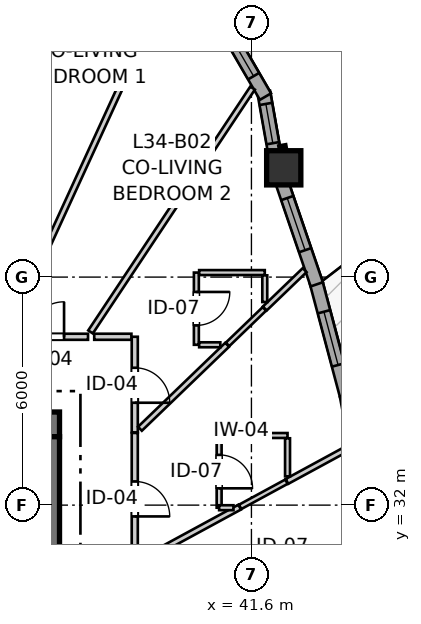
"""IFC4 building model, lengths in metres.
Left out: names, types, materials, properties, quantities, classifications, styles, units other than length and angle.
Written with IfcOpenShell. Run it as: python <this file> out.ifc"""

import sys

from ifc_helpers import new_model, si_unit, direction, frame, frame_2d, origin, origin_2d, place, context, subcontext, project, spatial, rectangle, extrude, source, transform, mapped, element, fill, save


model = new_model("IFC4")
c1 = context("Model", 3, precision=1e-05, world=origin(), true_north=direction((0.0, 1.0)))
c2 = subcontext(c1, "Body", "Model", "MODEL_VIEW")
j1 = project(units=[si_unit("LENGTHUNIT", "METRE"), si_unit("PLANEANGLEUNIT", "RADIAN")], contexts=[c1])
p1 = place(None, origin())
s1 = spatial("IfcSite", under=j1, at=p1, CompositionType="ELEMENT")
p2 = place(p1, origin())
s2 = spatial("IfcBuilding", under=s1, at=p2, CompositionType="ELEMENT")
p3 = place(p2, frame((0.0, 0.0, 115.2)))
s3 = spatial("IfcBuildingStorey", under=s2, at=p3, CompositionType="ELEMENT", Elevation=115.2)
p4 = place(p3, frame((36.55, 34.125, 0.0), z_axis=(0.0, 0.0, 1.0), x_axis=(-1.0, 0.0, 0.0)))
e1 = element("IfcWall", 1, at=p4, inside=s3, PredefinedType="SHEAR", context=c2, shape_type="SweptSolid", body=[
    extrude(rectangle(XDim=12.4, YDim=0.65, at=frame_2d((6.2, 0.0))), origin(), (0.0, 0.0, 1.0), 2.95),
])
p5 = place(p3, frame((36.225, 18.2, 0.0), z_axis=(0.0, 0.0, 1.0), x_axis=(0.0, 1.0, 0.0)))
e2 = element("IfcWall", 2, at=p5, inside=s3, PredefinedType="SHEAR", context=c2, shape_type="SweptSolid", body=[
    extrude(rectangle(XDim=15.6, YDim=0.65, at=frame_2d((7.8, 0.0))), origin(), (0.0, 0.0, 1.0), 2.95),
])
p6 = place(p5, frame((4.25, 0.0, 0.0)))
e3 = element("IfcOpeningElement", 3, at=p6, cuts=e2, PredefinedType="OPENING", context=c2, shape_type="SweptSolid", body=[
    extrude(rectangle(XDim=1.1, YDim=2.15, at=frame_2d((0.55, 1.075))), frame((0.0, 0.335, 0.0), z_axis=(0.0, -1.0, 0.0), x_axis=(1.0, 0.0, 0.0)), (0.0, 0.0, 1.0), 0.67),
])
p7 = place(p5, frame((10.25, 0.0, 0.0)))
e4 = element("IfcOpeningElement", 4, at=p7, cuts=e2, PredefinedType="OPENING", context=c2, shape_type="SweptSolid", body=[
    extrude(rectangle(XDim=1.1, YDim=2.15, at=frame_2d((0.55, 1.075))), frame((0.0, 0.335, 0.0), z_axis=(0.0, -1.0, 0.0), x_axis=(1.0, 0.0, 0.0)), (0.0, 0.0, 1.0), 0.67),
])
m1 = source(origin(), c2, "Body", "SweptSolid", [
    extrude(rectangle(XDim=0.9, YDim=0.9, at=origin_2d()), origin(), (0.0, 0.0, 1.0), 2.95),
])
p8 = place(p3, frame((42.45, 40.875, 0.0), z_axis=(0.0, 0.0, 1.0), x_axis=(1.0, 0.0, 0.0)))
e5 = element("IfcColumn", 5, at=p8, inside=s3, PredefinedType="COLUMN", context=c2, shape_type="MappedRepresentation", body=[
    mapped(m1, transform((0.0, 0.0, 0.0), x_axis=(1.0, 0.0, 0.0), y_axis=(0.0, 1.0, 0.0), z_axis=(0.0, 0.0, 1.0), scale=1.0)),
])
p9 = place(p3, frame((44.664, 31.881, 0.0), z_axis=(0.0, 0.0, 1.0), x_axis=(-0.18665909876, 0.982424745642, 0.0)))
e6 = element("IfcWall", 6, at=p9, inside=s3, PredefinedType="SOLIDWALL", context=c2, shape_type="SweptSolid", body=[
    extrude(rectangle(XDim=3.046, YDim=0.34, at=frame_2d((1.523, 0.0))), origin(), (0.0, 0.0, 1.0), 2.48),
])
p10 = place(p9, frame((0.416, 0.0, 0.82)))
e7 = element("IfcOpeningElement", 7, at=p10, cuts=e6, PredefinedType="OPENING", context=c2, shape_type="SweptSolid", body=[
    extrude(rectangle(XDim=0.95, YDim=1.35, at=frame_2d((0.475, 0.675))), frame((0.0, 0.18, 0.0), z_axis=(0.0, -1.0, 0.0), x_axis=(1.0, 0.0, 0.0)), (0.0, 0.0, 1.0), 0.36),
])
p11 = place(p9, frame((2.054, 0.0, 0.82)))
e8 = element("IfcOpeningElement", 8, at=p11, cuts=e6, PredefinedType="OPENING", context=c2, shape_type="SweptSolid", body=[
    extrude(rectangle(XDim=0.58, YDim=1.35, at=frame_2d((0.29, 0.675))), frame((0.0, 0.18, 0.0), z_axis=(0.0, -1.0, 0.0), x_axis=(1.0, 0.0, 0.0)), (0.0, 0.0, 1.0), 0.36),
])
p12 = place(p3, frame((44.09, 34.901, 0.0), z_axis=(0.0, 0.0, 1.0), x_axis=(-0.257108087637, 0.966382652613, 0.0)))
e9 = element("IfcWall", 9, at=p12, inside=s3, PredefinedType="SOLIDWALL", context=c2, shape_type="SweptSolid", body=[
    extrude(rectangle(XDim=3.096, YDim=0.34, at=frame_2d((1.548, 0.0))), origin(), (0.0, 0.0, 1.0), 2.48),
])
p13 = place(p12, frame((0.813, 0.0, 0.82)))
e10 = element("IfcOpeningElement", 10, at=p13, cuts=e9, PredefinedType="OPENING", context=c2, shape_type="SweptSolid", body=[
    extrude(rectangle(XDim=1.45, YDim=1.25, at=frame_2d((0.725, 0.625))), frame((0.0, 0.18, 0.0), z_axis=(0.0, -1.0, 0.0), x_axis=(1.0, 0.0, 0.0)), (0.0, 0.0, 1.0), 0.36),
])
p14 = place(p3, frame((43.319, 37.809, 0.0), z_axis=(0.0, 0.0, 1.0), x_axis=(-0.323586371726, 0.946198636669, 0.0)))
e11 = element("IfcWall", 11, at=p14, inside=s3, PredefinedType="SOLIDWALL", context=c2, shape_type="SweptSolid", body=[
    extrude(rectangle(XDim=2.952, YDim=0.34, at=frame_2d((1.476, 0.0))), origin(), (0.0, 0.0, 1.0), 2.48),
])
p15 = place(p14, frame((0.949, 0.0, 0.82)))
e12 = element("IfcOpeningElement", 12, at=p15, cuts=e11, PredefinedType="OPENING", context=c2, shape_type="SweptSolid", body=[
    extrude(rectangle(XDim=1.45, YDim=1.25, at=frame_2d((0.725, 0.625))), frame((0.0, 0.18, 0.0), z_axis=(0.0, -1.0, 0.0), x_axis=(1.0, 0.0, 0.0)), (0.0, 0.0, 1.0), 0.36),
])
p16 = place(p3, frame((42.242, 41.072, 0.0), z_axis=(0.0, 0.0, 1.0), x_axis=(-0.17440141227, 0.984674640375, 0.0)))
e13 = element("IfcWall", 13, at=p16, inside=s3, PredefinedType="SOLIDWALL", context=c2, shape_type="SweptSolid", body=[
    extrude(rectangle(XDim=1.831, YDim=0.34, at=frame_2d((0.916, 0.0))), origin(), (0.0, 0.0, 1.0), 2.48),
])
p17 = place(p16, frame((0.457, 0.0, 0.82)))
e14 = element("IfcOpeningElement", 14, at=p17, cuts=e13, PredefinedType="OPENING", context=c2, shape_type="SweptSolid", body=[
    extrude(rectangle(XDim=1.05, YDim=1.45, at=frame_2d((0.525, 0.725))), frame((0.0, 0.18, 0.0), z_axis=(0.0, -1.0, 0.0), x_axis=(1.0, 0.0, 0.0)), (0.0, 0.0, 1.0), 0.36),
])
p18 = place(p3, frame((41.969, 42.749, 0.0), z_axis=(0.0, 0.0, 1.0), x_axis=(-0.501989603552, 0.864873654313, 0.0)))
e15 = element("IfcWall", 15, at=p18, inside=s3, PredefinedType="SOLIDWALL", context=c2, shape_type="SweptSolid", body=[
    extrude(rectangle(XDim=2.099, YDim=0.34, at=frame_2d((1.05, 0.0))), origin(), (0.0, 0.0, 1.0), 2.48),
])
p19 = place(p18, frame((0.622, 0.0, 0.82)))
e16 = element("IfcOpeningElement", 16, at=p19, cuts=e15, PredefinedType="OPENING", context=c2, shape_type="SweptSolid", body=[
    extrude(rectangle(XDim=1.15, YDim=1.2, at=frame_2d((0.575, 0.6))), frame((0.0, 0.18, 0.0), z_axis=(0.0, -1.0, 0.0), x_axis=(1.0, 0.0, 0.0)), (0.0, 0.0, 1.0), 0.36),
])
p20 = place(p3, frame((38.53, 33.899, 0.0), z_axis=(0.0, 0.0, 1.0), x_axis=(0.0, -1.0, 0.0)))
e17 = element("IfcWall", 17, at=p20, inside=s3, PredefinedType="PARTITIONING", context=c2, shape_type="SweptSolid", body=[
    extrude(rectangle(XDim=3.469, YDim=0.16, at=frame_2d((1.734, 0.0))), origin(), (0.0, 0.0, 1.0), 2.95),
])
p21 = place(p20, frame((1.277, 0.0, 0.0)))
e18 = element("IfcOpeningElement", 18, at=p21, cuts=e17, PredefinedType="OPENING", context=c2, shape_type="SweptSolid", body=[
    extrude(rectangle(XDim=0.92, YDim=2.1, at=frame_2d((0.46, 1.05))), frame((0.0, 0.09, 0.0), z_axis=(0.0, -1.0, 0.0), x_axis=(1.0, 0.0, 0.0)), (0.0, 0.0, 1.0), 0.18),
])
p22 = place(p3, frame((38.53, 36.43, 0.0), z_axis=(0.0, 0.0, 1.0), x_axis=(0.0, -1.0, 0.0)))
e19 = element("IfcWall", 19, at=p22, inside=s3, PredefinedType="PARTITIONING", context=c2, shape_type="SweptSolid", body=[
    extrude(rectangle(XDim=2.516, YDim=0.16, at=frame_2d((1.258, 0.0))), origin(), (0.0, 0.0, 1.0), 2.588),
])
p23 = place(p22, frame((0.816, 0.0, 0.0)))
e20 = element("IfcOpeningElement", 20, at=p23, cuts=e19, PredefinedType="OPENING", context=c2, shape_type="SweptSolid", body=[
    extrude(rectangle(XDim=0.92, YDim=2.1, at=frame_2d((0.46, 1.05))), frame((0.0, 0.09, 0.0), z_axis=(0.0, -1.0, 0.0), x_axis=(1.0, 0.0, 0.0)), (0.0, 0.0, 1.0), 0.18),
])
p24 = place(p3, frame((35.121, 36.43, 0.0), z_axis=(0.0, 0.0, 1.0), x_axis=(1.0, 0.0, 0.0)))
e21 = element("IfcWall", 21, at=p24, inside=s3, PredefinedType="PARTITIONING", context=c2, shape_type="SweptSolid", body=[
    extrude(rectangle(XDim=2.179, YDim=0.16, at=frame_2d((1.089, 0.0))), origin(), (0.0, 0.0, 1.0), 2.588),
])
p25 = place(p24, frame((0.628, 0.0, 0.0)))
e22 = element("IfcOpeningElement", 22, at=p25, cuts=e21, PredefinedType="OPENING", context=c2, shape_type="SweptSolid", body=[
    extrude(rectangle(XDim=0.92, YDim=2.1, at=frame_2d((0.46, 1.05))), frame((0.0, 0.09, 0.0), z_axis=(0.0, -1.0, 0.0), x_axis=(1.0, 0.0, 0.0)), (0.0, 0.0, 1.0), 0.18),
])
p26 = place(p3, frame((40.75, 33.832, 0.0), z_axis=(0.0, 0.0, 1.0), x_axis=(0.0, -1.0, 0.0)))
e23 = element("IfcWall", 23, at=p26, inside=s3, PredefinedType="PARTITIONING", context=c2, shape_type="SweptSolid", body=[
    extrude(rectangle(XDim=1.9, YDim=0.13, at=frame_2d((0.95, 0.0))), origin(), (0.0, 0.0, 1.0), 2.95),
])
p27 = place(p26, frame((0.51, 0.0, 0.0)))
e24 = element("IfcOpeningElement", 24, at=p27, cuts=e23, PredefinedType="OPENING", context=c2, shape_type="SweptSolid", body=[
    extrude(rectangle(XDim=0.88, YDim=2.05, at=frame_2d((0.44, 1.025))), frame((0.0, 0.075, 0.0), z_axis=(0.0, -1.0, 0.0), x_axis=(1.0, 0.0, 0.0)), (0.0, 0.0, 1.0), 0.15),
])
p28 = place(p3, frame((40.151, 38.119, 0.0), z_axis=(0.0, 0.0, 1.0), x_axis=(0.0, -1.0, 0.0)))
e25 = element("IfcWall", 25, at=p28, inside=s3, PredefinedType="PARTITIONING", context=c2, shape_type="SweptSolid", body=[
    extrude(rectangle(XDim=1.9, YDim=0.13, at=frame_2d((0.95, 0.0))), origin(), (0.0, 0.0, 1.0), 2.95),
])
p29 = place(p28, frame((0.51, 0.0, 0.0)))
e26 = element("IfcOpeningElement", 26, at=p29, cuts=e25, PredefinedType="OPENING", context=c2, shape_type="SweptSolid", body=[
    extrude(rectangle(XDim=0.88, YDim=2.05, at=frame_2d((0.44, 1.025))), frame((0.0, 0.075, 0.0), z_axis=(0.0, -1.0, 0.0), x_axis=(1.0, 0.0, 0.0)), (0.0, 0.0, 1.0), 0.15),
])
p30 = place(p3, frame((35.191, 36.548, 0.0), z_axis=(0.0, 0.0, 1.0), x_axis=(0.417154036681, 0.908835799075, 0.0)))
e27 = element("IfcWall", 27, at=p30, inside=s3, PredefinedType="PARTITIONING", context=c2, shape_type="SweptSolid", body=[
    extrude(rectangle(XDim=9.949, YDim=0.145, at=frame_2d((4.974, 0.0))), origin(), (0.0, 0.0, 1.0), 2.95),
])
p31 = place(p3, frame((37.366, 36.557, 0.0), z_axis=(0.0, 0.0, 1.0), x_axis=(0.553463679146, 0.832873313215, 0.0)))
e28 = element("IfcWall", 28, at=p31, inside=s3, PredefinedType="PARTITIONING", context=c2, shape_type="SweptSolid", body=[
    extrude(rectangle(XDim=7.704, YDim=0.145, at=frame_2d((3.852, 0.0))), origin(), (0.0, 0.0, 1.0), 2.95),
])
p32 = place(p3, frame((38.666, 34.009, 0.0), z_axis=(0.0, 0.0, 1.0), x_axis=(0.72031454127, 0.693647577402, 0.0)))
e29 = element("IfcWall", 29, at=p32, inside=s3, PredefinedType="PARTITIONING", context=c2, shape_type="SweptSolid", body=[
    extrude(rectangle(XDim=3.186, YDim=0.145, at=frame_2d((1.593, 0.0))), origin(), (0.0, 0.0, 1.0), 2.95),
])
p33 = place(p3, frame((38.652, 30.513, 0.0), z_axis=(0.0, 0.0, 1.0), x_axis=(0.878637115469, 0.47749012484, 0.0)))
e30 = element("IfcWall", 30, at=p33, inside=s3, PredefinedType="PARTITIONING", context=c2, shape_type="SweptSolid", body=[
    extrude(rectangle(XDim=3.003, YDim=0.145, at=frame_2d((1.501, 0.0))), origin(), (0.0, 0.0, 1.0), 2.95),
])
p34 = place(p3, frame((42.535, 32.624, 0.0), z_axis=(0.0, 0.0, 1.0), x_axis=(0.878631690287, 0.477500107669, 0.0)))
e31 = element("IfcWall", 31, at=p34, inside=s3, PredefinedType="PARTITIONING", context=c2, shape_type="SweptSolid", body=[
    extrude(rectangle(XDim=1.861, YDim=0.145, at=frame_2d((0.93, 0.0))), origin(), (0.0, 0.0, 1.0), 2.95),
])
p35 = place(p3, frame((40.224, 38.119, 0.0), z_axis=(0.0, 0.0, 1.0), x_axis=(1.0, 0.0, 0.0)))
e32 = element("IfcWall", 32, at=p35, inside=s3, PredefinedType="PARTITIONING", context=c2, shape_type="SweptSolid", body=[
    extrude(rectangle(XDim=1.727, YDim=0.13, at=frame_2d((0.863, 0.0))), origin(), (0.0, 0.0, 1.0), 2.95),
])
p36 = place(p3, frame((40.823, 33.832, 0.0), z_axis=(0.0, 0.0, 1.0), x_axis=(1.0, 0.0, 0.0)))
e33 = element("IfcWall", 33, at=p36, inside=s3, PredefinedType="PARTITIONING", context=c2, shape_type="SweptSolid", body=[
    extrude(rectangle(XDim=1.727, YDim=0.13, at=frame_2d((0.864, 0.0))), origin(), (0.0, 0.0, 1.0), 2.95),
])
p37 = place(p3, frame((41.951, 37.173, 0.0), z_axis=(0.0, 0.0, 1.0), x_axis=(0.720559112487, 0.693393514111, 0.0)))
e34 = element("IfcWall", 34, at=p37, inside=s3, PredefinedType="PARTITIONING", context=c2, shape_type="SweptSolid", body=[
    extrude(rectangle(XDim=1.456, YDim=0.145, at=frame_2d((0.728, 0.0))), origin(), (0.0, 0.0, 1.0), 2.95),
])
p38 = place(p3, frame((41.303, 31.954, 0.0), z_axis=(0.0, 0.0, 1.0), x_axis=(0.87855387187, 0.477643270885, 0.0)))
e35 = element("IfcWall", 35, at=p38, inside=s3, PredefinedType="PARTITIONING", context=c2, shape_type="SweptSolid", body=[
    extrude(rectangle(XDim=1.387, YDim=0.13, at=frame_2d((0.694, 0.0))), origin(), (0.0, 0.0, 1.0), 2.95),
])
p39 = place(p3, frame((40.972, 36.229, 0.0), z_axis=(0.0, 0.0, 1.0), x_axis=(0.72014550452, 0.693823069896, 0.0)))
e36 = element("IfcWall", 36, at=p39, inside=s3, PredefinedType="PARTITIONING", context=c2, shape_type="SweptSolid", body=[
    extrude(rectangle(XDim=1.345, YDim=0.13, at=frame_2d((0.672, 0.0))), origin(), (0.0, 0.0, 1.0), 2.95),
])
p40 = place(p3, frame((37.463, 36.43, 0.0), z_axis=(0.0, 0.0, 1.0), x_axis=(1.0, 0.0, 0.0)))
e37 = element("IfcWall", 37, at=p40, inside=s3, PredefinedType="PARTITIONING", context=c2, shape_type="SweptSolid", body=[
    extrude(rectangle(XDim=0.979, YDim=0.16, at=frame_2d((0.489, 0.0))), origin(), (0.0, 0.0, 1.0), 2.588),
])
p41 = place(p3, frame((42.55, 32.758, 0.0), z_axis=(0.0, 0.0, 1.0), x_axis=(0.0, 1.0, 0.0)))
e38 = element("IfcWall", 38, at=p41, inside=s3, PredefinedType="PARTITIONING", context=c2, shape_type="SweptSolid", body=[
    extrude(rectangle(XDim=1.001, YDim=0.13, at=frame_2d((0.5, 0.0))), origin(), (0.0, 0.0, 1.0), 2.95),
])
p42 = place(p3, frame((41.951, 37.344, 0.0), z_axis=(0.0, 0.0, 1.0), x_axis=(0.0, 1.0, 0.0)))
e39 = element("IfcWall", 39, at=p42, inside=s3, PredefinedType="PARTITIONING", context=c2, shape_type="SweptSolid", body=[
    extrude(rectangle(XDim=0.702, YDim=0.13, at=frame_2d((0.351, 0.0))), origin(), (0.0, 0.0, 1.0), 2.95),
])
p43 = place(p3, frame((40.224, 36.219, 0.0), z_axis=(0.0, 0.0, 1.0), x_axis=(1.0, 0.0, 0.0)))
e40 = element("IfcWall", 40, at=p43, inside=s3, PredefinedType="PARTITIONING", context=c2, shape_type="SweptSolid", body=[
    extrude(rectangle(XDim=0.557, YDim=0.13, at=frame_2d((0.278, 0.0))), origin(), (0.0, 0.0, 1.0), 2.95),
])
p44 = place(p3, frame((40.75, 31.932, 0.0), z_axis=(0.0, 0.0, 1.0), x_axis=(1.0, 0.0, 0.0)))
e41 = element("IfcWall", 41, at=p44, inside=s3, PredefinedType="PARTITIONING", context=c2, shape_type="SweptSolid", body=[
    extrude(rectangle(XDim=0.377, YDim=0.13, at=frame_2d((0.188, 0.0))), origin(), (0.0, 0.0, 1.0), 2.95),
])
m2 = source(origin(), c2, "Body", "SweptSolid", [
    extrude(rectangle(XDim=1.45, YDim=1.25, at=frame_2d((0.725, 0.625))), frame((0.0, 0.03, 0.0), z_axis=(0.0, -1.0, 0.0), x_axis=(1.0, 0.0, 0.0)), (0.0, 0.0, 1.0), 0.06),
])
p45 = place(p13, origin())
e42 = element("IfcWindow", 42, at=p45, inside=s3, PartitioningType="SINGLE_PANEL", PredefinedType="WINDOW", context=c2, shape_type="MappedRepresentation", body=[
    mapped(m2, transform((0.0, 0.0, 0.0), x_axis=(1.0, 0.0, 0.0), y_axis=(0.0, 1.0, 0.0), z_axis=(0.0, 0.0, 1.0), scale=1.0)),
])
fill(e10, e42)
p46 = place(p15, origin())
e43 = element("IfcWindow", 43, at=p46, inside=s3, PartitioningType="SINGLE_PANEL", PredefinedType="WINDOW", context=c2, shape_type="MappedRepresentation", body=[
    mapped(m2, transform((0.0, 0.0, 0.0), x_axis=(1.0, 0.0, 0.0), y_axis=(0.0, 1.0, 0.0), z_axis=(0.0, 0.0, 1.0), scale=1.0)),
])
fill(e12, e43)
m3 = source(origin(), c2, "Body", "SweptSolid", [
    extrude(rectangle(XDim=1.05, YDim=1.45, at=frame_2d((0.525, 0.725))), frame((0.0, 0.03, 0.0), z_axis=(0.0, -1.0, 0.0), x_axis=(1.0, 0.0, 0.0)), (0.0, 0.0, 1.0), 0.06),
])
p47 = place(p17, origin())
e44 = element("IfcWindow", 44, at=p47, inside=s3, PartitioningType="SINGLE_PANEL", PredefinedType="WINDOW", context=c2, shape_type="MappedRepresentation", body=[
    mapped(m3, transform((0.0, 0.0, 0.0), x_axis=(1.0, 0.0, 0.0), y_axis=(0.0, 1.0, 0.0), z_axis=(0.0, 0.0, 1.0), scale=1.0)),
])
fill(e14, e44)
m4 = source(origin(), c2, "Body", "SweptSolid", [
    extrude(rectangle(XDim=1.15, YDim=1.2, at=frame_2d((0.575, 0.6))), frame((0.0, 0.03, 0.0), z_axis=(0.0, -1.0, 0.0), x_axis=(1.0, 0.0, 0.0)), (0.0, 0.0, 1.0), 0.06),
])
p48 = place(p19, origin())
e45 = element("IfcWindow", 45, at=p48, inside=s3, PartitioningType="SINGLE_PANEL", PredefinedType="WINDOW", context=c2, shape_type="MappedRepresentation", body=[
    mapped(m4, transform((0.0, 0.0, 0.0), x_axis=(1.0, 0.0, 0.0), y_axis=(0.0, 1.0, 0.0), z_axis=(0.0, 0.0, 1.0), scale=1.0)),
])
fill(e16, e45)
m5 = source(origin(), c2, "Body", "SweptSolid", [
    extrude(rectangle(XDim=0.92, YDim=2.1, at=frame_2d((0.46, 1.05))), frame((0.0, 0.025, 0.0), z_axis=(0.0, -1.0, 0.0), x_axis=(1.0, 0.0, 0.0)), (0.0, 0.0, 1.0), 0.05),
])
p49 = place(p21, origin())
e46 = element("IfcDoor", 46, at=p49, inside=s3, OperationType="SINGLE_SWING_RIGHT", PredefinedType="DOOR", context=c2, shape_type="MappedRepresentation", body=[
    mapped(m5, transform((0.0, 0.0, 0.0), x_axis=(1.0, 0.0, 0.0), y_axis=(0.0, 1.0, 0.0), z_axis=(0.0, 0.0, 1.0), scale=1.0)),
])
fill(e18, e46)
p50 = place(p23, origin())
e47 = element("IfcDoor", 47, at=p50, inside=s3, OperationType="SINGLE_SWING_RIGHT", PredefinedType="DOOR", context=c2, shape_type="MappedRepresentation", body=[
    mapped(m5, transform((0.0, 0.0, 0.0), x_axis=(1.0, 0.0, 0.0), y_axis=(0.0, 1.0, 0.0), z_axis=(0.0, 0.0, 1.0), scale=1.0)),
])
fill(e20, e47)
p51 = place(p25, origin())
e48 = element("IfcDoor", 48, at=p51, inside=s3, OperationType="SINGLE_SWING_RIGHT", PredefinedType="DOOR", context=c2, shape_type="MappedRepresentation", body=[
    mapped(m5, transform((0.0, 0.0, 0.0), x_axis=(1.0, 0.0, 0.0), y_axis=(0.0, 1.0, 0.0), z_axis=(0.0, 0.0, 1.0), scale=1.0)),
])
fill(e22, e48)
m6 = source(origin(), c2, "Body", "SweptSolid", [
    extrude(rectangle(XDim=0.88, YDim=2.05, at=frame_2d((0.44, 1.025))), frame((0.0, 0.025, 0.0), z_axis=(0.0, -1.0, 0.0), x_axis=(1.0, 0.0, 0.0)), (0.0, 0.0, 1.0), 0.05),
])
p52 = place(p27, origin())
e49 = element("IfcDoor", 49, at=p52, inside=s3, OperationType="SINGLE_SWING_RIGHT", PredefinedType="DOOR", context=c2, shape_type="MappedRepresentation", body=[
    mapped(m6, transform((0.0, 0.0, 0.0), x_axis=(1.0, 0.0, 0.0), y_axis=(0.0, 1.0, 0.0), z_axis=(0.0, 0.0, 1.0), scale=1.0)),
])
fill(e24, e49)
p53 = place(p29, origin())
e50 = element("IfcDoor", 50, at=p53, inside=s3, OperationType="SINGLE_SWING_LEFT", PredefinedType="DOOR", context=c2, shape_type="MappedRepresentation", body=[
    mapped(m6, transform((0.0, 0.0, 0.0), x_axis=(1.0, 0.0, 0.0), y_axis=(0.0, 1.0, 0.0), z_axis=(0.0, 0.0, 1.0), scale=1.0)),
])
fill(e26, e50)
save(model, sys.argv[1])
